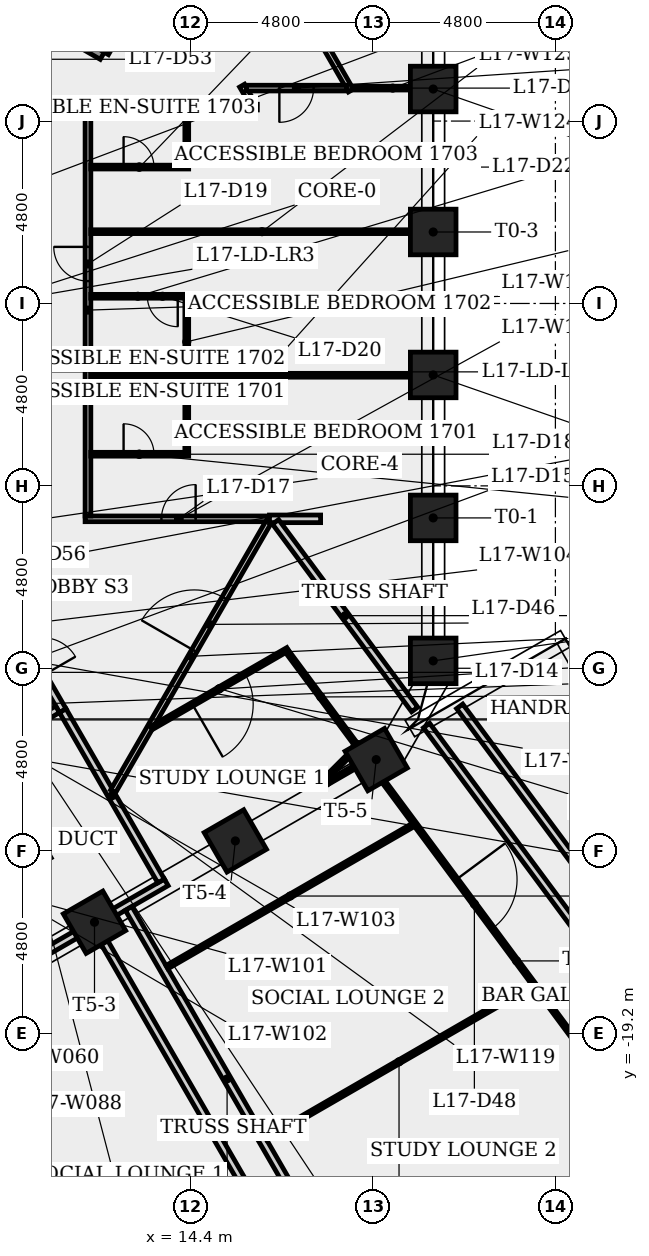
"""IFC4 building model, lengths in metres.
Left out: names, types, materials, properties, quantities, classifications, styles, units other than length and angle.
Written with IfcOpenShell. Run it as: python <this file> out.ifc"""

import sys

from ifc_helpers import new_model, si_unit, direction, frame, frame_2d, origin, origin_2d, place, context, subcontext, project, spatial, rectangle, extrude, element, fill, save


model = new_model("IFC4")
c1 = context("Model", 3, precision=1e-05, world=origin(), true_north=direction((0.0, 1.0)))
c2 = subcontext(c1, "Body", "Model", "MODEL_VIEW")
j1 = project(units=[si_unit("LENGTHUNIT", "METRE"), si_unit("PLANEANGLEUNIT", "RADIAN")], contexts=[c1])
p1 = place(None, origin())
s1 = spatial("IfcSite", under=j1, at=p1, CompositionType="ELEMENT")
p2 = place(p1, origin())
s2 = spatial("IfcBuilding", under=s1, at=p2, CompositionType="ELEMENT")
p3 = place(p2, frame((0.0, 0.0, 66.3)))
s3 = spatial("IfcBuildingStorey", under=s2, at=p3, CompositionType="ELEMENT", Elevation=66.3)
for number, where, z_axis, x_axis in (
    (1, (20.785, -9.405, 0.0), (0.0, 0.0, 1.0), (1.0, 0.0, 0.0)),
    (2, (20.785, -5.643, 0.0), (0.0, 0.0, 1.0), (1.0, 0.0, 0.0)),
    (3, (20.785, -1.881, 0.0), (0.0, 0.0, 1.0), (1.0, 0.0, 0.0)),
    (4, (20.785, 1.881, 0.0), (0.0, 0.0, 1.0), (1.0, 0.0, 0.0)),
    (5, (20.785, 5.643, 0.0), (0.0, 0.0, 1.0), (1.0, 0.0, 0.0)),
    (6, (11.872, -16.283, 0.0), (0.0, 0.0, 1.0), (0.5, -0.866, 0.0)),
    (7, (15.578, -14.143, 0.0), (0.0, 0.0, 1.0), (0.5, -0.866, 0.0)),
    (8, (19.285, -12.003, 0.0), (0.0, 0.0, 1.0), (0.5, -0.866, 0.0)),
):
    element("IfcColumn", number, at=place(p3, frame(where, z_axis=z_axis, x_axis=x_axis)), inside=s3, PredefinedType="COLUMN", context=c2, shape_type="SweptSolid", body=[
        extrude(rectangle(XDim=1.2, YDim=1.2, at=origin_2d()), origin(), (0.0, 0.0, 1.0), 4.0),
    ])
p4 = place(p3, frame((5.561, -19.831, 0.0), z_axis=(0.0, 0.0, 1.0), x_axis=(0.500009798456, -0.866019746569, 0.0)))
e9 = element("IfcWall", 9, at=p4, inside=s3, PredefinedType="PARTITIONING", context=c2, shape_type="SweptSolid", body=[
    extrude(rectangle(XDim=13.018, YDim=0.1, at=frame_2d((6.509, 0.0))), origin(), (0.0, 0.0, 1.0), 3.6),
])
p5 = place(p4, frame((5.734, 0.0, 0.0)))
e10 = element("IfcOpeningElement", 10, at=p5, cuts=e9, PredefinedType="OPENING", context=c2, shape_type="SweptSolid", body=[
    extrude(rectangle(XDim=1.6, YDim=2.1, at=frame_2d((0.8, 1.05))), frame((0.0, 0.06, 0.0), z_axis=(0.0, -1.0, 0.0), x_axis=(1.0, 0.0, 0.0)), (0.0, 0.0, 1.0), 0.12),
])
p6 = place(p3, frame((9.537, -8.119, 0.0), z_axis=(0.0, 0.0, 1.0), x_axis=(0.499990139034, -0.866031096941, 0.0)))
e11 = element("IfcWall", 11, at=p6, inside=s3, PredefinedType="PARTITIONING", context=c2, shape_type="SweptSolid", body=[
    extrude(rectangle(XDim=3.0, YDim=0.2, at=frame_2d((1.5, 0.0))), origin(), (0.0, 0.0, 1.0), 3.6),
])
p7 = place(p6, frame((0.935, 0.0, 0.0)))
e12 = element("IfcOpeningElement", 12, at=p7, cuts=e11, PredefinedType="OPENING", context=c2, shape_type="SweptSolid", body=[
    extrude(rectangle(XDim=1.0, YDim=2.1, at=frame_2d((0.5, 1.05))), frame((0.0, 0.11, 0.0), z_axis=(0.0, -1.0, 0.0), x_axis=(1.0, 0.0, 0.0)), (0.0, 0.0, 1.0), 0.22),
])
p8 = place(p3, frame((5.966, -19.733, 0.0), z_axis=(0.0, 0.0, 1.0), x_axis=(0.866024315419, 0.5000018851, 0.0)))
e13 = element("IfcWall", 13, at=p8, inside=s3, PredefinedType="PLUMBINGWALL", context=c2, shape_type="SweptSolid", body=[
    extrude(rectangle(XDim=9.0, YDim=0.2, at=frame_2d((4.5, 0.0))), origin(), (0.0, 0.0, 1.0), 2.675),
])
p9 = place(p3, frame((10.901, -10.681, 0.0), z_axis=(0.0, 0.0, 1.0), x_axis=(-0.866007538022, -0.500030943131, 0.0)))
e14 = element("IfcWall", 14, at=p9, inside=s3, PredefinedType="PLUMBINGWALL", context=c2, shape_type="SweptSolid", body=[
    extrude(rectangle(XDim=2.375, YDim=0.2, at=frame_2d((1.188, 0.0))), origin(), (0.0, 0.0, 1.0), 3.6),
])
p10 = place(p3, frame((11.037, -10.717, 0.0), z_axis=(0.0, 0.0, 1.0), x_axis=(0.500012553759, -0.866018155747, 0.0)))
e15 = element("IfcWall", 15, at=p10, inside=s3, PredefinedType="PLUMBINGWALL", context=c2, shape_type="SweptSolid", body=[
    extrude(rectangle(XDim=5.172, YDim=0.2, at=frame_2d((2.586, 0.0))), origin(), (0.0, 0.0, 1.0), 3.6),
])
p11 = place(p3, frame((11.625, -5.667, 0.0), z_axis=(0.0, 0.0, 1.0), x_axis=(1.0, 0.0, 0.0)))
e16 = element("IfcWall", 16, at=p11, inside=s3, PredefinedType="PARTITIONING", context=c2, shape_type="SweptSolid", body=[
    extrude(rectangle(XDim=4.952, YDim=0.15, at=frame_2d((2.476, 0.0))), origin(), (0.0, 0.0, 1.0), 3.6),
])
p12 = place(p11, frame((2.009, 0.0, 0.0)))
e17 = element("IfcOpeningElement", 17, at=p12, cuts=e16, PredefinedType="OPENING", context=c2, shape_type="SweptSolid", body=[
    extrude(rectangle(XDim=0.9, YDim=2.1, at=frame_2d((0.45, 1.05))), frame((0.0, 0.085, 0.0), z_axis=(0.0, -1.0, 0.0), x_axis=(1.0, 0.0, 0.0)), (0.0, 0.0, 1.0), 0.17),
])
p13 = place(p3, frame((11.7, -5.592, 0.0), z_axis=(0.0, 0.0, 1.0), x_axis=(0.0, 1.0, 0.0)))
e18 = element("IfcWall", 18, at=p13, inside=s3, PredefinedType="PARTITIONING", context=c2, shape_type="SweptSolid", body=[
    extrude(rectangle(XDim=10.835, YDim=0.15, at=frame_2d((5.417, 0.0))), origin(), (0.0, 0.0, 1.0), 3.6),
])
p14 = place(p13, frame((6.181, 0.0, 0.0)))
e19 = element("IfcOpeningElement", 19, at=p14, cuts=e18, PredefinedType="OPENING", context=c2, shape_type="SweptSolid", body=[
    extrude(rectangle(XDim=0.9, YDim=2.1, at=frame_2d((0.45, 1.05))), frame((0.0, 0.085, 0.0), z_axis=(0.0, -1.0, 0.0), x_axis=(1.0, 0.0, 0.0)), (0.0, 0.0, 1.0), 0.17),
])
p15 = place(p3, frame((11.775, -3.967, 0.0), z_axis=(0.0, 0.0, 1.0), x_axis=(1.0, 0.0, 0.0)))
e20 = element("IfcWall", 20, at=p15, inside=s3, PredefinedType="PARTITIONING", context=c2, shape_type="SweptSolid", body=[
    extrude(rectangle(XDim=2.575, YDim=0.1, at=frame_2d((1.288, 0.0))), origin(), (0.0, 0.0, 1.0), 3.6),
])
p16 = place(p15, frame((0.863, 0.0, 0.0)))
e21 = element("IfcOpeningElement", 21, at=p16, cuts=e20, PredefinedType="OPENING", context=c2, shape_type="SweptSolid", body=[
    extrude(rectangle(XDim=0.8, YDim=2.1, at=frame_2d((0.4, 1.05))), frame((0.0, 0.06, 0.0), z_axis=(0.0, -1.0, 0.0), x_axis=(1.0, 0.0, 0.0)), (0.0, 0.0, 1.0), 0.12),
])
for number, where, z_axis, x_axis in (
    (22, (11.775, -1.889, 0.0), (0.0, 0.0, 1.0), (1.0, 0.0, 0.0)),
    (23, (11.775, 1.889, 0.0), (0.0, 0.0, 1.0), (1.0, 0.0, 0.0)),
):
    element("IfcWall", number, at=place(p3, frame(where, z_axis=z_axis, x_axis=x_axis)), inside=s3, PredefinedType="PARTITIONING", context=c2, shape_type="SweptSolid", body=[
        extrude(rectangle(XDim=9.01, YDim=0.1, at=frame_2d((4.505, 0.0))), origin(), (0.0, 0.0, 1.0), 3.6),
    ])
p17 = place(p3, frame((11.775, 3.589, 0.0), z_axis=(0.0, 0.0, 1.0), x_axis=(1.0, 0.0, 0.0)))
e24 = element("IfcWall", 24, at=p17, inside=s3, PredefinedType="PARTITIONING", context=c2, shape_type="SweptSolid", body=[
    extrude(rectangle(XDim=2.575, YDim=0.1, at=frame_2d((1.288, 0.0))), origin(), (0.0, 0.0, 1.0), 3.6),
])
p18 = place(p17, frame((0.863, 0.0, 0.0)))
e25 = element("IfcOpeningElement", 25, at=p18, cuts=e24, PredefinedType="OPENING", context=c2, shape_type="SweptSolid", body=[
    extrude(rectangle(XDim=0.8, YDim=2.1, at=frame_2d((0.4, 1.05))), frame((0.0, 0.06, 0.0), z_axis=(0.0, -1.0, 0.0), x_axis=(1.0, 0.0, 0.0)), (0.0, 0.0, 1.0), 0.12),
])
p19 = place(p3, frame((12.085, 6.532, 0.0), z_axis=(0.0, 0.0, 1.0), x_axis=(-0.86604373436, 0.499968249168, 0.0)))
e26 = element("IfcWall", 26, at=p19, inside=s3, PredefinedType="SHEAR", context=c2, shape_type="SweptSolid", body=[
    extrude(rectangle(XDim=1.118, YDim=0.25, at=frame_2d((0.559, 0.0))), origin(), (0.0, 0.0, 1.0), 3.6),
])
p20 = place(p3, frame((12.771, -15.92, 0.0), z_axis=(0.0, 0.0, 1.0), x_axis=(0.499989546451, -0.86603143906, 0.0)))
e27 = element("IfcWall", 27, at=p20, inside=s3, PredefinedType="PLUMBINGWALL", context=c2, shape_type="SweptSolid", body=[
    extrude(rectangle(XDim=12.95, YDim=0.2, at=frame_2d((6.475, 0.0))), origin(), (0.0, 0.0, 1.0), 3.6),
])
p21 = place(p3, frame((12.362, -12.838, 0.0), z_axis=(0.0, 0.0, 1.0), x_axis=(0.500004918852, 0.866022563865, 0.0)))
e28 = element("IfcWall", 28, at=p21, inside=s3, PredefinedType="PARTITIONING", context=c2, shape_type="SweptSolid", body=[
    extrude(rectangle(XDim=8.205, YDim=0.15, at=frame_2d((4.103, 0.0))), origin(), (0.0, 0.0, 1.0), 3.6),
])
p22 = place(p21, frame((4.273, 0.0, 0.0)))
e29 = element("IfcOpeningElement", 29, at=p22, cuts=e28, PredefinedType="OPENING", context=c2, shape_type="SweptSolid", body=[
    extrude(rectangle(XDim=1.6, YDim=2.1, at=frame_2d((0.8, 1.05))), frame((0.0, 0.085, 0.0), z_axis=(0.0, -1.0, 0.0), x_axis=(1.0, 0.0, 0.0)), (0.0, 0.0, 1.0), 0.17),
])
p23 = place(p3, frame((13.523, 9.022, 0.0), z_axis=(0.0, 0.0, 1.0), x_axis=(-0.500013277472, -0.866017737897, 0.0)))
e30 = element("IfcWall", 30, at=p23, inside=s3, PredefinedType="SHEAR", context=c2, shape_type="SweptSolid", body=[
    extrude(rectangle(XDim=2.786, YDim=0.25, at=frame_2d((1.393, 0.0))), origin(), (0.0, 0.0, 1.0), 3.6),
])
p24 = place(p3, frame((14.3, -3.917, 0.0), z_axis=(0.0, 0.0, 1.0), x_axis=(0.0, 1.0, 0.0)))
e31 = element("IfcWall", 31, at=p24, inside=s3, PredefinedType="PARTITIONING", context=c2, shape_type="SweptSolid", body=[
    extrude(rectangle(XDim=4.156, YDim=0.1, at=frame_2d((2.078, 0.0))), origin(), (0.0, 0.0, 1.0), 3.6),
])
p25 = place(p3, frame((14.25, 0.189, 0.0), z_axis=(0.0, 0.0, 1.0), x_axis=(-1.0, 0.0, 0.0)))
e32 = element("IfcWall", 32, at=p25, inside=s3, PredefinedType="PARTITIONING", context=c2, shape_type="SweptSolid", body=[
    extrude(rectangle(XDim=2.475, YDim=0.1, at=frame_2d((1.238, 0.0))), origin(), (0.0, 0.0, 1.0), 3.6),
])
p26 = place(p25, frame((0.188, 0.0, 0.0)))
e33 = element("IfcOpeningElement", 33, at=p26, cuts=e32, PredefinedType="OPENING", context=c2, shape_type="SweptSolid", body=[
    extrude(rectangle(XDim=0.8, YDim=2.1, at=frame_2d((0.4, 1.05))), frame((0.0, 0.06, 0.0), z_axis=(0.0, -1.0, 0.0), x_axis=(1.0, 0.0, 0.0)), (0.0, 0.0, 1.0), 0.12),
])
p27 = place(p3, frame((14.3, 3.639, 0.0), z_axis=(0.0, 0.0, 1.0), x_axis=(0.0, 1.0, 0.0)))
e34 = element("IfcWall", 34, at=p27, inside=s3, PredefinedType="PARTITIONING", context=c2, shape_type="SweptSolid", body=[
    extrude(rectangle(XDim=1.453, YDim=0.1, at=frame_2d((0.727, 0.0))), origin(), (0.0, 0.0, 1.0), 3.6),
])
p28 = place(p3, frame((11.775, 5.167, 0.0), z_axis=(0.0, 0.0, 1.0), x_axis=(1.0, 0.0, 0.0)))
e35 = element("IfcWall", 35, at=p28, inside=s3, PredefinedType="PARTITIONING", context=c2, shape_type="SweptSolid", body=[
    extrude(rectangle(XDim=4.382, YDim=0.15, at=frame_2d((2.191, 0.0))), origin(), (0.0, 0.0, 1.0), 3.6),
])
p29 = place(p3, frame((15.133, 11.638, 0.0), z_axis=(0.0, 0.0, 1.0), x_axis=(0.500004447669, -0.866022835906, 0.0)))
e36 = element("IfcWall", 36, at=p29, inside=s3, PredefinedType="PARTITIONING", context=c2, shape_type="SweptSolid", body=[
    extrude(rectangle(XDim=6.97, YDim=0.15, at=frame_2d((3.485, 0.0))), origin(), (0.0, 0.0, 1.0), 3.6),
])
p30 = place(p29, frame((2.93, 0.0, 0.0)))
e37 = element("IfcOpeningElement", 37, at=p30, cuts=e36, PredefinedType="OPENING", context=c2, shape_type="SweptSolid", body=[
    extrude(rectangle(XDim=1.0, YDim=2.1, at=frame_2d((0.5, 1.05))), frame((0.0, 0.085, 0.0), z_axis=(0.0, -1.0, 0.0), x_axis=(1.0, 0.0, 0.0)), (0.0, 0.0, 1.0), 0.17),
])
p31 = place(p3, frame((15.756, 5.732, 0.0), z_axis=(0.0, 0.0, 1.0), x_axis=(0.500186019832, -0.865917978543, 0.0)))
e38 = element("IfcWall", 38, at=p31, inside=s3, PredefinedType="PARTITIONING", context=c2, shape_type="SweptSolid", body=[
    extrude(rectangle(XDim=0.577, YDim=0.15, at=frame_2d((0.289, 0.0))), origin(), (0.0, 0.0, 1.0), 3.6),
])
p32 = place(p3, frame((16.958, -9.099, 0.0), z_axis=(0.0, 0.0, 1.0), x_axis=(-0.866042429026, -0.499970510257, 0.0)))
e39 = element("IfcWall", 39, at=p32, inside=s3, PredefinedType="PARTITIONING", context=c2, shape_type="SweptSolid", body=[
    extrude(rectangle(XDim=4.146, YDim=0.1, at=frame_2d((2.073, 0.0))), origin(), (0.0, 0.0, 1.0), 3.6),
])
p33 = place(p32, frame((1.298, 0.0, 0.0)))
e40 = element("IfcOpeningElement", 40, at=p33, cuts=e39, PredefinedType="OPENING", context=c2, shape_type="SweptSolid", body=[
    extrude(rectangle(XDim=1.6, YDim=2.1, at=frame_2d((0.8, 1.05))), frame((0.0, 0.06, 0.0), z_axis=(0.0, -1.0, 0.0), x_axis=(1.0, 0.0, 0.0)), (0.0, 0.0, 1.0), 0.12),
])
p34 = place(p3, frame((17.822, -5.667, 0.0), z_axis=(0.0, 0.0, 1.0), x_axis=(-1.0, 0.0, 0.0)))
e41 = element("IfcWall", 41, at=p34, inside=s3, PredefinedType="PLUMBINGWALL", context=c2, shape_type="SweptSolid", body=[
    extrude(rectangle(XDim=1.345, YDim=0.2, at=frame_2d((0.673, 0.0))), origin(), (0.0, 0.0, 1.0), 3.6),
])
p35 = place(p3, frame((17.883, -12.574, 0.0), z_axis=(0.0, 0.0, 1.0), x_axis=(0.707106781187, 0.707106781187, 0.0)))
e42 = element("IfcWall", 42, at=p35, inside=s3, PredefinedType="PARTITIONING", context=c2, shape_type="SweptSolid", body=[
    extrude(rectangle(XDim=1.19, YDim=0.1, at=frame_2d((0.595, 0.0))), origin(), (0.0, 0.0, 1.0), 2.675),
])
p36 = place(p3, frame((18.013, -12.662, 0.0), z_axis=(0.0, 0.0, 1.0), x_axis=(-0.608139126224, 0.793830462476, 0.0)))
e43 = element("IfcWall", 43, at=p36, inside=s3, PredefinedType="PARTITIONING", context=c2, shape_type="SweptSolid", body=[
    extrude(rectangle(XDim=0.105, YDim=0.1, at=frame_2d((0.053, 0.0))), origin(), (0.0, 0.0, 1.0), 3.6),
])
p37 = place(p3, frame((18.38, -27.635, 0.0), z_axis=(0.0, 0.0, 1.0), x_axis=(-0.500003685891, 0.866023275724, 0.0)))
e44 = element("IfcWall", 44, at=p37, inside=s3, PredefinedType="PLUMBINGWALL", context=c2, shape_type="SweptSolid", body=[
    extrude(rectangle(XDim=12.95, YDim=0.2, at=frame_2d((6.475, 0.0))), origin(), (0.0, 0.0, 1.0), 3.6),
])
p38 = place(p3, frame((18.655, 5.667, 0.0), z_axis=(0.0, 0.0, 1.0), x_axis=(1.0, 0.0, 0.0)))
e45 = element("IfcWall", 45, at=p38, inside=s3, PredefinedType="PARTITIONING", context=c2, shape_type="SweptSolid", body=[
    extrude(rectangle(XDim=2.129, YDim=0.1, at=frame_2d((1.065, 0.0))), origin(), (0.0, 0.0, 1.0), 3.6),
])
p39 = place(p3, frame((18.505, 5.667, 0.0), z_axis=(0.0, 0.0, 1.0), x_axis=(-1.0, 0.0, 0.0)))
e46 = element("IfcWall", 46, at=p39, inside=s3, PredefinedType="PARTITIONING", context=c2, shape_type="SweptSolid", body=[
    extrude(rectangle(XDim=2.637, YDim=0.15, at=frame_2d((1.319, 0.0))), origin(), (0.0, 0.0, 1.0), 3.6),
])
p40 = place(p39, frame((0.869, 0.0, 0.0)))
e47 = element("IfcOpeningElement", 47, at=p40, cuts=e46, PredefinedType="OPENING", context=c2, shape_type="SweptSolid", body=[
    extrude(rectangle(XDim=0.9, YDim=2.1, at=frame_2d((0.45, 1.05))), frame((0.0, 0.085, 0.0), z_axis=(0.0, -1.0, 0.0), x_axis=(1.0, 0.0, 0.0)), (0.0, 0.0, 1.0), 0.17),
])
p41 = place(p3, frame((18.702, -11.72, 0.0), z_axis=(0.0, 0.0, 1.0), x_axis=(0.257902224814, 0.966171021319, 0.0)))
e48 = element("IfcWall", 48, at=p41, inside=s3, PredefinedType="PARTITIONING", context=c2, shape_type="SweptSolid", body=[
    extrude(rectangle(XDim=0.19, YDim=0.1, at=frame_2d((0.095, 0.0))), origin(), (0.0, 0.0, 1.0), 3.6),
])
p42 = place(p3, frame((18.709, -11.544, 0.0), z_axis=(0.0, 0.0, 1.0), x_axis=(-0.595692593252, 0.803212508832, 0.0)))
e49 = element("IfcWall", 49, at=p42, inside=s3, PredefinedType="PARTITIONING", context=c2, shape_type="SweptSolid", body=[
    extrude(rectangle(XDim=2.962, YDim=0.1, at=frame_2d((1.481, 0.0))), origin(), (0.0, 0.0, 1.0), 3.6),
])
p43 = place(p3, frame((19.094, -11.98, 0.0), z_axis=(0.0, 0.0, 1.0), x_axis=(-0.866030726613, -0.499990780478, 0.0)))
e50 = element("IfcWall", 50, at=p43, inside=s3, PredefinedType="PARTITIONING", context=c2, shape_type="SweptSolid", body=[
    extrude(rectangle(XDim=1.234, YDim=0.1, at=frame_2d((0.617, 0.0))), origin(), (0.0, 0.0, 1.0), 2.675),
])
p44 = place(p3, frame((19.282, -26.998, 0.0), z_axis=(0.0, 0.0, 1.0), x_axis=(0.866024561644, 0.500001458627, 0.0)))
e51 = element("IfcWall", 51, at=p44, inside=s3, PredefinedType="PARTITIONING", context=c2, shape_type="SweptSolid", body=[
    extrude(rectangle(XDim=10.503, YDim=0.1, at=frame_2d((5.252, 0.0))), origin(), (0.0, 0.0, 1.0), 3.6),
])
p45 = place(p44, frame((9.168, 0.0, 0.0)))
e52 = element("IfcOpeningElement", 52, at=p45, cuts=e51, PredefinedType="OPENING", context=c2, shape_type="SweptSolid", body=[
    extrude(rectangle(XDim=1.0, YDim=2.1, at=frame_2d((0.5, 1.05))), frame((0.0, 0.06, 0.0), z_axis=(0.0, -1.0, 0.0), x_axis=(1.0, 0.0, 0.0)), (0.0, 0.0, 1.0), 0.12),
])
p46 = place(p44, frame((3.587, 0.0, 0.0)))
e53 = element("IfcOpeningElement", 53, at=p46, cuts=e51, PredefinedType="OPENING", context=c2, shape_type="SweptSolid", body=[
    extrude(rectangle(XDim=1.6, YDim=2.1, at=frame_2d((0.8, 1.05))), frame((0.0, 0.06, 0.0), z_axis=(0.0, -1.0, 0.0), x_axis=(1.0, 0.0, 0.0)), (0.0, 0.0, 1.0), 0.12),
])
p47 = place(p3, frame((20.297, -10.684, 0.0), z_axis=(0.0, 0.0, 1.0), x_axis=(-0.595739477662, 0.80317773547, 0.0)))
e54 = element("IfcWall", 54, at=p47, inside=s3, PredefinedType="PLUMBINGWALL", context=c2, shape_type="SweptSolid", body=[
    extrude(rectangle(XDim=6.146, YDim=0.2, at=frame_2d((3.073, 0.0))), origin(), (0.0, 0.0, 1.0), 3.6),
])
p48 = place(p3, frame((20.262, -13.722, 0.0), z_axis=(0.0, 0.0, 1.0), x_axis=(-0.866021041913, -0.500007554907, 0.0)))
e55 = element("IfcWall", 55, at=p48, inside=s3, PredefinedType="PARTITIONING", context=c2, shape_type="SweptSolid", body=[
    extrude(rectangle(XDim=7.487, YDim=0.1, at=frame_2d((3.743, 0.0))), origin(), (0.0, 0.0, 1.0), 3.6),
])
p49 = place(p3, frame((19.081, -12.045, 0.0), z_axis=(0.0, 0.0, 1.0), x_axis=(0.595719994052, -0.803192186644, 0.0)))
e56 = element("IfcWall", 56, at=p49, inside=s3, PredefinedType="PARTITIONING", context=c2, shape_type="SweptSolid", body=[
    extrude(rectangle(XDim=13.086, YDim=0.1, at=frame_2d((6.543, 0.0))), origin(), (0.0, 0.0, 1.0), 3.6),
])
p50 = place(p49, frame((3.878, 0.0, 0.0)))
e57 = element("IfcOpeningElement", 57, at=p50, cuts=e56, PredefinedType="OPENING", context=c2, shape_type="SweptSolid", body=[
    extrude(rectangle(XDim=1.6, YDim=2.1, at=frame_2d((0.8, 1.05))), frame((0.0, 0.06, 0.0), z_axis=(0.0, -1.0, 0.0), x_axis=(1.0, 0.0, 0.0)), (0.0, 0.0, 1.0), 0.12),
])
p51 = place(p3, frame((21.482, -10.602, 0.0), z_axis=(0.0, 0.0, 1.0), x_axis=(0.595707756501, -0.803201262975, 0.0)))
e58 = element("IfcWall", 58, at=p51, inside=s3, PredefinedType="PLUMBINGWALL", context=c2, shape_type="SweptSolid", body=[
    extrude(rectangle(XDim=13.286, YDim=0.2, at=frame_2d((6.643, 0.0))), origin(), (0.0, 0.0, 1.0), 3.6),
])
p52 = place(p3, frame((23.387, -17.935, 0.0), z_axis=(0.0, 0.0, 1.0), x_axis=(-0.866021679419, -0.500006450734, 0.0)))
e59 = element("IfcWall", 59, at=p52, inside=s3, PredefinedType="PARTITIONING", context=c2, shape_type="SweptSolid", body=[
    extrude(rectangle(XDim=8.086, YDim=0.1, at=frame_2d((4.043, 0.0))), origin(), (0.0, 0.0, 1.0), 3.6),
])
p53 = place(p3, frame((28.525, -21.777, 0.0), z_axis=(0.0, 0.0, 1.0), x_axis=(-0.595719610783, 0.803192470911, 0.0)))
e60 = element("IfcWall", 60, at=p53, inside=s3, PredefinedType="PLUMBINGWALL", context=c2, shape_type="SweptSolid", body=[
    extrude(rectangle(XDim=13.287, YDim=0.2, at=frame_2d((6.643, 0.0))), origin(), (0.0, 0.0, 1.0), 3.6),
])
p54 = place(p12, origin())
e61 = element("IfcDoor", 61, at=p54, inside=s3, OperationType="SINGLE_SWING_RIGHT", PredefinedType="DOOR", context=c2, shape_type="SweptSolid", body=[
    extrude(rectangle(XDim=0.9, YDim=2.1, at=frame_2d((0.45, 1.05))), frame((0.0, 0.025, 0.0), z_axis=(0.0, -1.0, 0.0), x_axis=(1.0, 0.0, 0.0)), (0.0, 0.0, 1.0), 0.05),
])
fill(e17, e61)
p55 = place(p16, origin())
e62 = element("IfcDoor", 62, at=p55, inside=s3, OperationType="SINGLE_SWING_LEFT", PredefinedType="DOOR", context=c2, shape_type="SweptSolid", body=[
    extrude(rectangle(XDim=0.8, YDim=2.1, at=frame_2d((0.4, 1.05))), frame((0.0, 0.025, 0.0), z_axis=(0.0, -1.0, 0.0), x_axis=(1.0, 0.0, 0.0)), (0.0, 0.0, 1.0), 0.05),
])
fill(e21, e62)
p56 = place(p14, origin())
e63 = element("IfcDoor", 63, at=p56, inside=s3, OperationType="SINGLE_SWING_RIGHT", PredefinedType="DOOR", context=c2, shape_type="SweptSolid", body=[
    extrude(rectangle(XDim=0.9, YDim=2.1, at=frame_2d((0.45, 1.05))), frame((0.0, 0.025, 0.0), z_axis=(0.0, -1.0, 0.0), x_axis=(1.0, 0.0, 0.0)), (0.0, 0.0, 1.0), 0.05),
])
fill(e19, e63)
p57 = place(p26, origin())
e64 = element("IfcDoor", 64, at=p57, inside=s3, OperationType="SINGLE_SWING_LEFT", PredefinedType="DOOR", context=c2, shape_type="SweptSolid", body=[
    extrude(rectangle(XDim=0.8, YDim=2.1, at=frame_2d((0.4, 1.05))), frame((0.0, 0.025, 0.0), z_axis=(0.0, -1.0, 0.0), x_axis=(1.0, 0.0, 0.0)), (0.0, 0.0, 1.0), 0.05),
])
fill(e33, e64)
p58 = place(p40, origin())
e65 = element("IfcDoor", 65, at=p58, inside=s3, OperationType="SINGLE_SWING_RIGHT", PredefinedType="DOOR", context=c2, shape_type="SweptSolid", body=[
    extrude(rectangle(XDim=0.9, YDim=2.1, at=frame_2d((0.45, 1.05))), frame((0.0, 0.025, 0.0), z_axis=(0.0, -1.0, 0.0), x_axis=(1.0, 0.0, 0.0)), (0.0, 0.0, 1.0), 0.05),
])
fill(e47, e65)
p59 = place(p18, origin())
e66 = element("IfcDoor", 66, at=p59, inside=s3, OperationType="SINGLE_SWING_LEFT", PredefinedType="DOOR", context=c2, shape_type="SweptSolid", body=[
    extrude(rectangle(XDim=0.8, YDim=2.1, at=frame_2d((0.4, 1.05))), frame((0.0, 0.025, 0.0), z_axis=(0.0, -1.0, 0.0), x_axis=(1.0, 0.0, 0.0)), (0.0, 0.0, 1.0), 0.05),
])
fill(e25, e66)
p60 = place(p22, origin())
e67 = element("IfcDoor", 67, at=p60, inside=s3, OperationType="SINGLE_SWING_LEFT", PredefinedType="DOOR", context=c2, shape_type="SweptSolid", body=[
    extrude(rectangle(XDim=1.6, YDim=2.1, at=frame_2d((0.8, 1.05))), frame((0.0, 0.025, 0.0), z_axis=(0.0, -1.0, 0.0), x_axis=(1.0, 0.0, 0.0)), (0.0, 0.0, 1.0), 0.05),
])
fill(e29, e67)
p61 = place(p33, origin())
e68 = element("IfcDoor", 68, at=p61, inside=s3, OperationType="SINGLE_SWING_RIGHT", PredefinedType="DOOR", context=c2, shape_type="SweptSolid", body=[
    extrude(rectangle(XDim=1.6, YDim=2.1, at=frame_2d((0.8, 1.05))), frame((0.0, 0.025, 0.0), z_axis=(0.0, -1.0, 0.0), x_axis=(1.0, 0.0, 0.0)), (0.0, 0.0, 1.0), 0.05),
])
fill(e40, e68)
p62 = place(p50, origin())
e69 = element("IfcDoor", 69, at=p62, inside=s3, OperationType="SINGLE_SWING_LEFT", PredefinedType="DOOR", context=c2, shape_type="SweptSolid", body=[
    extrude(rectangle(XDim=1.6, YDim=2.1, at=frame_2d((0.8, 1.05))), frame((0.0, 0.025, 0.0), z_axis=(0.0, -1.0, 0.0), x_axis=(1.0, 0.0, 0.0)), (0.0, 0.0, 1.0), 0.05),
])
fill(e57, e69)
save(model, sys.argv[1])
